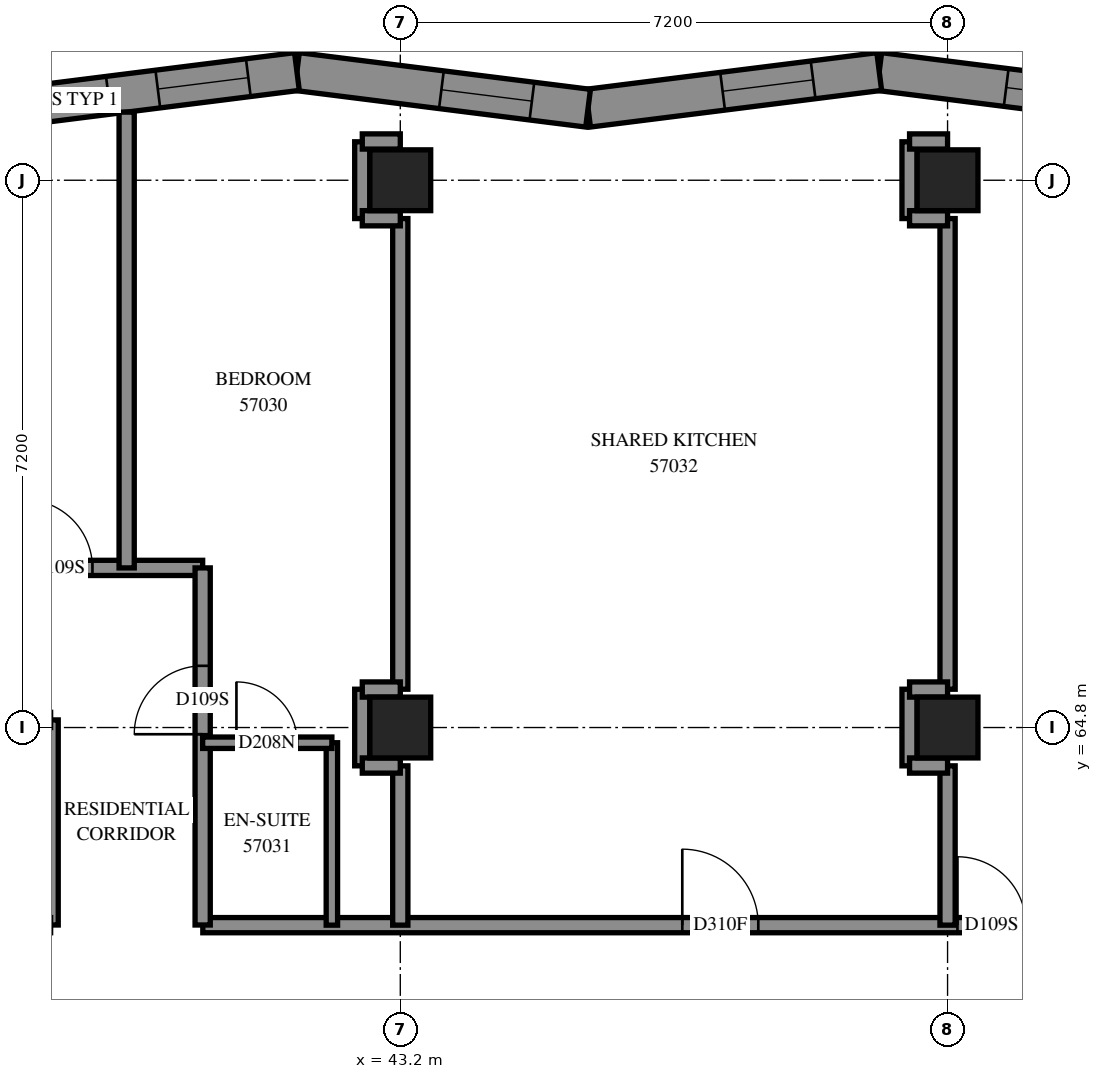
"""IFC4 building model, lengths in metres.
Left out: names, types, materials, properties, quantities, classifications, styles, units other than length and angle.
Written with IfcOpenShell. Run it as: python <this file> out.ifc"""

import sys

from ifc_helpers import new_model, si_unit, direction, frame, frame_2d, origin, origin_2d, place, context, subcontext, project, spatial, polyline, rectangle, outline, extrude, element, fill, save


model = new_model("IFC4")
c1 = context("Model", 3, precision=1e-05, world=origin(), true_north=direction((0.0, 1.0)))
c2 = subcontext(c1, "Body", "Model", "MODEL_VIEW")
j1 = project(units=[si_unit("LENGTHUNIT", "METRE"), si_unit("PLANEANGLEUNIT", "RADIAN")], contexts=[c1])
p1 = place(None, origin())
s1 = spatial("IfcSite", under=j1, at=p1, CompositionType="ELEMENT")
p2 = place(p1, origin())
s2 = spatial("IfcBuilding", under=s1, at=p2, CompositionType="ELEMENT")
p3 = place(p2, frame((0.0, 0.0, 210.0)))
s3 = spatial("IfcBuildingStorey", under=s2, at=p3, CompositionType="ELEMENT", Elevation=210.0)
for number, where, z_axis, x_axis in (
    (1, (43.2, 64.8, 0.0), (0.0, 0.0, 1.0), (1.0, 0.0, 0.0)),
    (2, (43.2, 72.0, 0.0), (0.0, 0.0, 1.0), (1.0, 0.0, 0.0)),
    (3, (50.4, 64.8, 0.0), (0.0, 0.0, 1.0), (1.0, 0.0, 0.0)),
    (4, (50.4, 72.0, 0.0), (0.0, 0.0, 1.0), (1.0, 0.0, 0.0)),
):
    element("IfcColumn", number, at=place(p3, frame(where, z_axis=z_axis, x_axis=x_axis)), inside=s3, PredefinedType="COLUMN", context=c2, shape_type="SweptSolid", body=[
        extrude(rectangle(XDim=0.8, YDim=0.8, at=origin_2d()), origin(), (0.0, 0.0, 1.0), 3.1),
    ])
p4 = place(p3, frame((53.332, 72.948, 0.0), z_axis=(0.0, 0.0, 1.0), x_axis=(-0.9921759282, 0.1248476171, 0.0)))
e5 = element("IfcWall", 5, at=p4, inside=s3, PredefinedType="SOLIDWALL", context=c2, shape_type="SweptSolid", body=[
    extrude(outline(polyline([(0.032, -0.25), (3.892, -0.25), (3.829, 0.25), (-0.032, 0.25), (0.032, -0.25)])), origin(), (0.0, 0.0, 1.0), 3.1),
])
p5 = place(p4, frame((0.977, 0.0, 0.45)))
e6 = element("IfcOpeningElement", 6, at=p5, cuts=e5, PredefinedType="OPENING", context=c2, shape_type="SweptSolid", body=[
    extrude(rectangle(XDim=1.2, YDim=2.5, at=frame_2d((0.6, 1.25))), frame((0.0, 0.26, 0.0), z_axis=(0.0, -1.0, 0.0), x_axis=(1.0, 0.0, 0.0)), (0.0, 0.0, 1.0), 0.52),
])
p6 = place(p3, frame((49.501, 73.43, 0.0), z_axis=(0.0, 0.0, 1.0), x_axis=(-0.9921759282, -0.1248476171, 0.0)))
e7 = element("IfcWall", 7, at=p6, inside=s3, PredefinedType="SOLIDWALL", context=c2, shape_type="SweptSolid", body=[
    extrude(outline(polyline([(-0.032, -0.25), (3.829, -0.25), (3.892, 0.25), (0.032, 0.25), (-0.032, -0.25)])), origin(), (0.0, 0.0, 1.0), 3.1),
])
p7 = place(p6, frame((0.877, 0.0, 0.45)))
e8 = element("IfcOpeningElement", 8, at=p7, cuts=e7, PredefinedType="OPENING", context=c2, shape_type="SweptSolid", body=[
    extrude(rectangle(XDim=1.2, YDim=2.5, at=frame_2d((0.6, 1.25))), frame((0.0, 0.26, 0.0), z_axis=(0.0, -1.0, 0.0), x_axis=(1.0, 0.0, 0.0)), (0.0, 0.0, 1.0), 0.52),
])
p8 = place(p3, frame((45.671, 72.948, 0.0), z_axis=(0.0, 0.0, 1.0), x_axis=(-0.9921759282, 0.1248476171, 0.0)))
e9 = element("IfcWall", 9, at=p8, inside=s3, PredefinedType="SOLIDWALL", context=c2, shape_type="SweptSolid", body=[
    extrude(outline(polyline([(0.032, -0.25), (3.892, -0.25), (3.829, 0.25), (-0.032, 0.25), (0.032, -0.25)])), origin(), (0.0, 0.0, 1.0), 3.1),
])
p9 = place(p8, frame((0.745, 0.0, 0.45)))
e10 = element("IfcOpeningElement", 10, at=p9, cuts=e9, PredefinedType="OPENING", context=c2, shape_type="SweptSolid", body=[
    extrude(rectangle(XDim=1.2, YDim=2.5, at=frame_2d((0.6, 1.25))), frame((0.0, 0.26, 0.0), z_axis=(0.0, -1.0, 0.0), x_axis=(1.0, 0.0, 0.0)), (0.0, 0.0, 1.0), 0.52),
])
p10 = place(p3, frame((41.84, 73.43, 0.0), z_axis=(0.0, 0.0, 1.0), x_axis=(-0.9921759282, -0.1248476171, 0.0)))
e11 = element("IfcWall", 11, at=p10, inside=s3, PredefinedType="SOLIDWALL", context=c2, shape_type="SweptSolid", body=[
    extrude(outline(polyline([(-0.032, -0.25), (3.829, -0.25), (3.892, 0.25), (0.032, 0.25), (-0.032, -0.25)])), origin(), (0.0, 0.0, 1.0), 3.1),
])
p11 = place(p10, frame((0.645, 0.0, 0.45)))
e12 = element("IfcOpeningElement", 12, at=p11, cuts=e11, PredefinedType="OPENING", context=c2, shape_type="SweptSolid", body=[
    extrude(rectangle(XDim=1.2, YDim=2.5, at=frame_2d((0.6, 1.25))), frame((0.0, 0.26, 0.0), z_axis=(0.0, -1.0, 0.0), x_axis=(1.0, 0.0, 0.0)), (0.0, 0.0, 1.0), 0.52),
])
p12 = place(p10, frame((2.5, 0.0, 0.45)))
e13 = element("IfcOpeningElement", 13, at=p12, cuts=e11, PredefinedType="OPENING", context=c2, shape_type="SweptSolid", body=[
    extrude(rectangle(XDim=1.0, YDim=2.5, at=frame_2d((0.5, 1.25))), frame((0.0, 0.26, 0.0), z_axis=(0.0, -1.0, 0.0), x_axis=(1.0, 0.0, 0.0)), (0.0, 0.0, 1.0), 0.52),
])
p13 = place(p3, frame((40.602, 62.2, 0.0), z_axis=(0.0, 0.0, 1.0), x_axis=(1.0, 0.0, 0.0)))
e14 = element("IfcWall", 14, at=p13, inside=s3, PredefinedType="PARTITIONING", context=c2, shape_type="SweptSolid", body=[
    extrude(rectangle(XDim=14.998, YDim=0.2, at=frame_2d((7.499, 0.0))), origin(), (0.0, 0.0, 1.0), 3.1),
])
p14 = place(p13, frame((6.308, 0.0, 0.0)))
e15 = element("IfcOpeningElement", 15, at=p14, cuts=e14, PredefinedType="OPENING", context=c2, shape_type="SweptSolid", body=[
    extrude(rectangle(XDim=1.0, YDim=2.1, at=frame_2d((0.5, 1.05))), frame((0.0, 0.11, 0.0), z_axis=(0.0, -1.0, 0.0), x_axis=(1.0, 0.0, 0.0)), (0.0, 0.0, 1.0), 0.22),
])
p15 = place(p13, frame((9.928, 0.0, 0.0)))
e16 = element("IfcOpeningElement", 16, at=p15, cuts=e14, PredefinedType="OPENING", context=c2, shape_type="SweptSolid", body=[
    extrude(rectangle(XDim=0.9, YDim=2.1, at=frame_2d((0.45, 1.05))), frame((0.0, 0.11, 0.0), z_axis=(0.0, -1.0, 0.0), x_axis=(1.0, 0.0, 0.0)), (0.0, 0.0, 1.0), 0.22),
])
p16 = place(p13, frame((13.746, 0.0, 0.0)))
e17 = element("IfcOpeningElement", 17, at=p16, cuts=e14, PredefinedType="OPENING", context=c2, shape_type="SweptSolid", body=[
    extrude(rectangle(XDim=1.0, YDim=2.1, at=frame_2d((0.5, 1.05))), frame((0.0, 0.11, 0.0), z_axis=(0.0, -1.0, 0.0), x_axis=(1.0, 0.0, 0.0)), (0.0, 0.0, 1.0), 0.22),
])
p17 = place(p3, frame((28.802, 66.9, 0.0), z_axis=(0.0, 0.0, 1.0), x_axis=(1.0, 0.0, 0.0)))
e18 = element("IfcWall", 18, at=p17, inside=s3, PredefinedType="PARTITIONING", context=c2, shape_type="SweptSolid", body=[
    extrude(rectangle(XDim=11.798, YDim=0.2, at=frame_2d((5.899, 0.0))), origin(), (0.0, 0.0, 1.0), 3.1),
])
p18 = place(p17, frame((1.805, 0.0, 0.0)))
e19 = element("IfcOpeningElement", 19, at=p18, cuts=e18, PredefinedType="OPENING", context=c2, shape_type="SweptSolid", body=[
    extrude(rectangle(XDim=1.0, YDim=2.1, at=frame_2d((0.5, 1.05))), frame((0.0, 0.11, 0.0), z_axis=(0.0, -1.0, 0.0), x_axis=(1.0, 0.0, 0.0)), (0.0, 0.0, 1.0), 0.22),
])
p19 = place(p17, frame((3.998, 0.0, 0.0)))
e20 = element("IfcOpeningElement", 20, at=p19, cuts=e18, PredefinedType="OPENING", context=c2, shape_type="SweptSolid", body=[
    extrude(rectangle(XDim=0.9, YDim=2.1, at=frame_2d((0.45, 1.05))), frame((0.0, 0.11, 0.0), z_axis=(0.0, -1.0, 0.0), x_axis=(1.0, 0.0, 0.0)), (0.0, 0.0, 1.0), 0.22),
])
p20 = place(p17, frame((9.448, 0.0, 0.0)))
e21 = element("IfcOpeningElement", 21, at=p20, cuts=e18, PredefinedType="OPENING", context=c2, shape_type="SweptSolid", body=[
    extrude(rectangle(XDim=0.9, YDim=2.1, at=frame_2d((0.45, 1.05))), frame((0.0, 0.11, 0.0), z_axis=(0.0, -1.0, 0.0), x_axis=(1.0, 0.0, 0.0)), (0.0, 0.0, 1.0), 0.22),
])
for number, where, z_axis, x_axis in (
    (22, (43.2, 65.304, 0.0), (0.0, 0.0, 1.0), (0.0, 1.0, 0.0)),
    (23, (50.4, 65.304, 0.0), (0.0, 0.0, 1.0), (0.0, 1.0, 0.0)),
):
    element("IfcWall", number, at=place(p3, frame(where, z_axis=z_axis, x_axis=x_axis)), inside=s3, PredefinedType="PARTITIONING", context=c2, shape_type="SweptSolid", body=[
        extrude(rectangle(XDim=6.192, YDim=0.2, at=frame_2d((3.096, 0.0))), origin(), (0.0, 0.0, 1.0), 3.1),
    ])
p21 = place(p3, frame((39.6, 66.9, 0.0), z_axis=(0.0, 0.0, 1.0), x_axis=(0.0, 1.0, 0.0)))
e24 = element("IfcWall", 24, at=p21, inside=s3, PredefinedType="PARTITIONING", context=c2, shape_type="SweptSolid", body=[
    extrude(rectangle(XDim=5.996, YDim=0.2, at=frame_2d((2.998, 0.0))), origin(), (0.0, 0.0, 1.0), 3.1),
])
p22 = place(p3, frame((40.6, 62.202, 0.0), z_axis=(0.0, 0.0, 1.0), x_axis=(0.0, 1.0, 0.0)))
e25 = element("IfcWall", 25, at=p22, inside=s3, PredefinedType="PARTITIONING", context=c2, shape_type="SweptSolid", body=[
    extrude(rectangle(XDim=4.698, YDim=0.2, at=frame_2d((2.349, 0.0))), origin(), (0.0, 0.0, 1.0), 3.1),
])
p23 = place(p22, frame((2.51, 0.0, 0.0)))
e26 = element("IfcOpeningElement", 26, at=p23, cuts=e25, PredefinedType="OPENING", context=c2, shape_type="SweptSolid", body=[
    extrude(rectangle(XDim=0.9, YDim=2.1, at=frame_2d((0.45, 1.05))), frame((0.0, 0.11, 0.0), z_axis=(0.0, -1.0, 0.0), x_axis=(1.0, 0.0, 0.0)), (0.0, 0.0, 1.0), 0.22),
])
p24 = place(p3, frame((38.6, 62.202, 0.0), z_axis=(0.0, 0.0, 1.0), x_axis=(0.0, 1.0, 0.0)))
e27 = element("IfcWall", 27, at=p24, inside=s3, PredefinedType="PARTITIONING", context=c2, shape_type="SweptSolid", body=[
    extrude(rectangle(XDim=2.698, YDim=0.2, at=frame_2d((1.349, 0.0))), origin(), (0.0, 0.0, 1.0), 3.1),
])
p25 = place(p3, frame((42.3, 62.2, 0.0), z_axis=(0.0, 0.0, 1.0), x_axis=(0.0, 1.0, 0.0)))
e28 = element("IfcWall", 28, at=p25, inside=s3, PredefinedType="PARTITIONING", context=c2, shape_type="SweptSolid", body=[
    extrude(rectangle(XDim=2.4, YDim=0.15, at=frame_2d((1.2, 0.0))), origin(), (0.0, 0.0, 1.0), 3.1),
])
for number, where, z_axis, x_axis in (
    (29, (43.2, 62.2, 0.0), (0.0, 0.0, 1.0), (0.0, 1.0, 0.0)),
    (30, (50.4, 62.2, 0.0), (0.0, 0.0, 1.0), (0.0, 1.0, 0.0)),
):
    element("IfcWall", number, at=place(p3, frame(where, z_axis=z_axis, x_axis=x_axis)), inside=s3, PredefinedType="PARTITIONING", context=c2, shape_type="SweptSolid", body=[
        extrude(rectangle(XDim=2.096, YDim=0.2, at=frame_2d((1.048, 0.0))), origin(), (0.0, 0.0, 1.0), 3.1),
    ])
p26 = place(p3, frame((40.6, 64.6, 0.0), z_axis=(0.0, 0.0, 1.0), x_axis=(1.0, 0.0, 0.0)))
e31 = element("IfcWall", 31, at=p26, inside=s3, PredefinedType="PARTITIONING", context=c2, shape_type="SweptSolid", body=[
    extrude(rectangle(XDim=1.7, YDim=0.15, at=frame_2d((0.85, 0.0))), origin(), (0.0, 0.0, 1.0), 3.1),
])
p27 = place(p26, frame((0.444, 0.0, 0.0)))
e32 = element("IfcOpeningElement", 32, at=p27, cuts=e31, PredefinedType="OPENING", context=c2, shape_type="SweptSolid", body=[
    extrude(rectangle(XDim=0.8, YDim=2.1, at=frame_2d((0.4, 1.05))), frame((0.0, 0.085, 0.0), z_axis=(0.0, -1.0, 0.0), x_axis=(1.0, 0.0, 0.0)), (0.0, 0.0, 1.0), 0.17),
])
for number, where, z_axis, x_axis in (
    (33, (42.7, 71.496, 0.0), (0.0, 0.0, 1.0), (0.0, 1.0, 0.0)),
    (34, (49.9, 71.496, 0.0), (0.0, 0.0, 1.0), (0.0, 1.0, 0.0)),
):
    element("IfcWall", number, at=place(p3, frame(where, z_axis=z_axis, x_axis=x_axis)), inside=s3, PredefinedType="PARTITIONING", context=c2, shape_type="SweptSolid", body=[
        extrude(rectangle(XDim=1.01, YDim=0.2, at=frame_2d((0.505, 0.0))), origin(), (0.0, 0.0, 1.0), 3.1),
    ])
for number, where, z_axis, x_axis in (
    (35, (42.7, 64.296, 0.0), (0.0, 0.0, 1.0), (0.0, 1.0, 0.0)),
    (36, (49.9, 64.296, 0.0), (0.0, 0.0, 1.0), (0.0, 1.0, 0.0)),
):
    element("IfcWall", number, at=place(p3, frame(where, z_axis=z_axis, x_axis=x_axis)), inside=s3, PredefinedType="PARTITIONING", context=c2, shape_type="SweptSolid", body=[
        extrude(rectangle(XDim=1.008, YDim=0.2, at=frame_2d((0.504, 0.0))), origin(), (0.0, 0.0, 1.0), 3.1),
    ])
for number, where, z_axis, x_axis in (
    (37, (42.7, 72.51, 0.0), (0.0, 0.0, 1.0), (1.0, 0.0, 0.0)),
    (38, (49.9, 72.51, 0.0), (0.0, 0.0, 1.0), (1.0, 0.0, 0.0)),
    (39, (42.7, 71.5, 0.0), (0.0, 0.0, 1.0), (1.0, 0.0, 0.0)),
    (40, (49.9, 71.5, 0.0), (0.0, 0.0, 1.0), (1.0, 0.0, 0.0)),
    (41, (42.7, 65.3, 0.0), (0.0, 0.0, 1.0), (1.0, 0.0, 0.0)),
    (42, (49.9, 65.3, 0.0), (0.0, 0.0, 1.0), (1.0, 0.0, 0.0)),
    (43, (42.7, 64.3, 0.0), (0.0, 0.0, 1.0), (1.0, 0.0, 0.0)),
    (44, (49.9, 64.3, 0.0), (0.0, 0.0, 1.0), (1.0, 0.0, 0.0)),
):
    element("IfcWall", number, at=place(p3, frame(where, z_axis=z_axis, x_axis=x_axis)), inside=s3, PredefinedType="PARTITIONING", context=c2, shape_type="SweptSolid", body=[
        extrude(rectangle(XDim=0.5, YDim=0.2, at=frame_2d((0.25, 0.0))), origin(), (0.0, 0.0, 1.0), 3.1),
    ])
p28 = place(p5, origin())
e45 = element("IfcWindow", 45, at=p28, inside=s3, PartitioningType="SINGLE_PANEL", PredefinedType="WINDOW", context=c2, shape_type="SweptSolid", body=[
    extrude(rectangle(XDim=1.2, YDim=2.5, at=frame_2d((0.6, 1.25))), frame((0.0, 0.18, 0.0), z_axis=(0.0, -1.0, 0.0), x_axis=(1.0, 0.0, 0.0)), (0.0, 0.0, 1.0), 0.06),
])
fill(e6, e45)
p29 = place(p7, origin())
e46 = element("IfcWindow", 46, at=p29, inside=s3, PartitioningType="SINGLE_PANEL", PredefinedType="WINDOW", context=c2, shape_type="SweptSolid", body=[
    extrude(rectangle(XDim=1.2, YDim=2.5, at=frame_2d((0.6, 1.25))), frame((0.0, 0.18, 0.0), z_axis=(0.0, -1.0, 0.0), x_axis=(1.0, 0.0, 0.0)), (0.0, 0.0, 1.0), 0.06),
])
fill(e8, e46)
p30 = place(p9, origin())
e47 = element("IfcWindow", 47, at=p30, inside=s3, PartitioningType="SINGLE_PANEL", PredefinedType="WINDOW", context=c2, shape_type="SweptSolid", body=[
    extrude(rectangle(XDim=1.2, YDim=2.5, at=frame_2d((0.6, 1.25))), frame((0.0, 0.18, 0.0), z_axis=(0.0, -1.0, 0.0), x_axis=(1.0, 0.0, 0.0)), (0.0, 0.0, 1.0), 0.06),
])
fill(e10, e47)
p31 = place(p11, origin())
e48 = element("IfcWindow", 48, at=p31, inside=s3, PartitioningType="SINGLE_PANEL", PredefinedType="WINDOW", context=c2, shape_type="SweptSolid", body=[
    extrude(rectangle(XDim=1.2, YDim=2.5, at=frame_2d((0.6, 1.25))), frame((0.0, 0.18, 0.0), z_axis=(0.0, -1.0, 0.0), x_axis=(1.0, 0.0, 0.0)), (0.0, 0.0, 1.0), 0.06),
])
fill(e12, e48)
p32 = place(p20, origin())
e49 = element("IfcDoor", 49, at=p32, inside=s3, OperationType="SINGLE_SWING_RIGHT", PredefinedType="DOOR", context=c2, shape_type="SweptSolid", body=[
    extrude(rectangle(XDim=0.9, YDim=2.1, at=frame_2d((0.45, 1.05))), frame((0.0, 0.025, 0.0), z_axis=(0.0, -1.0, 0.0), x_axis=(1.0, 0.0, 0.0)), (0.0, 0.0, 1.0), 0.05),
])
fill(e21, e49)
p33 = place(p23, origin())
e50 = element("IfcDoor", 50, at=p33, inside=s3, OperationType="SINGLE_SWING_LEFT", PredefinedType="DOOR", context=c2, shape_type="SweptSolid", body=[
    extrude(rectangle(XDim=0.9, YDim=2.1, at=frame_2d((0.45, 1.05))), frame((0.0, 0.025, 0.0), z_axis=(0.0, -1.0, 0.0), x_axis=(1.0, 0.0, 0.0)), (0.0, 0.0, 1.0), 0.05),
])
fill(e26, e50)
p34 = place(p27, origin())
e51 = element("IfcDoor", 51, at=p34, inside=s3, OperationType="SINGLE_SWING_RIGHT", PredefinedType="DOOR", context=c2, shape_type="SweptSolid", body=[
    extrude(rectangle(XDim=0.8, YDim=2.1, at=frame_2d((0.4, 1.05))), frame((0.0, 0.025, 0.0), z_axis=(0.0, -1.0, 0.0), x_axis=(1.0, 0.0, 0.0)), (0.0, 0.0, 1.0), 0.05),
])
fill(e32, e51)
p35 = place(p14, origin())
e52 = element("IfcDoor", 52, at=p35, inside=s3, OperationType="SINGLE_SWING_RIGHT", PredefinedType="DOOR", context=c2, shape_type="SweptSolid", body=[
    extrude(rectangle(XDim=1.0, YDim=2.1, at=frame_2d((0.5, 1.05))), frame((0.0, 0.025, 0.0), z_axis=(0.0, -1.0, 0.0), x_axis=(1.0, 0.0, 0.0)), (0.0, 0.0, 1.0), 0.05),
])
fill(e15, e52)
p36 = place(p15, origin())
e53 = element("IfcDoor", 53, at=p36, inside=s3, OperationType="SINGLE_SWING_RIGHT", PredefinedType="DOOR", context=c2, shape_type="SweptSolid", body=[
    extrude(rectangle(XDim=0.9, YDim=2.1, at=frame_2d((0.45, 1.05))), frame((0.0, 0.025, 0.0), z_axis=(0.0, -1.0, 0.0), x_axis=(1.0, 0.0, 0.0)), (0.0, 0.0, 1.0), 0.05),
])
fill(e16, e53)
p37 = place(p12, origin())
e54 = element("IfcWindow", 54, at=p37, inside=s3, PartitioningType="SINGLE_PANEL", PredefinedType="WINDOW", context=c2, shape_type="SweptSolid", body=[
    extrude(rectangle(XDim=1.0, YDim=2.5, at=frame_2d((0.5, 1.25))), frame((0.0, 0.18, 0.0), z_axis=(0.0, -1.0, 0.0), x_axis=(1.0, 0.0, 0.0)), (0.0, 0.0, 1.0), 0.06),
])
fill(e13, e54)
save(model, sys.argv[1])
